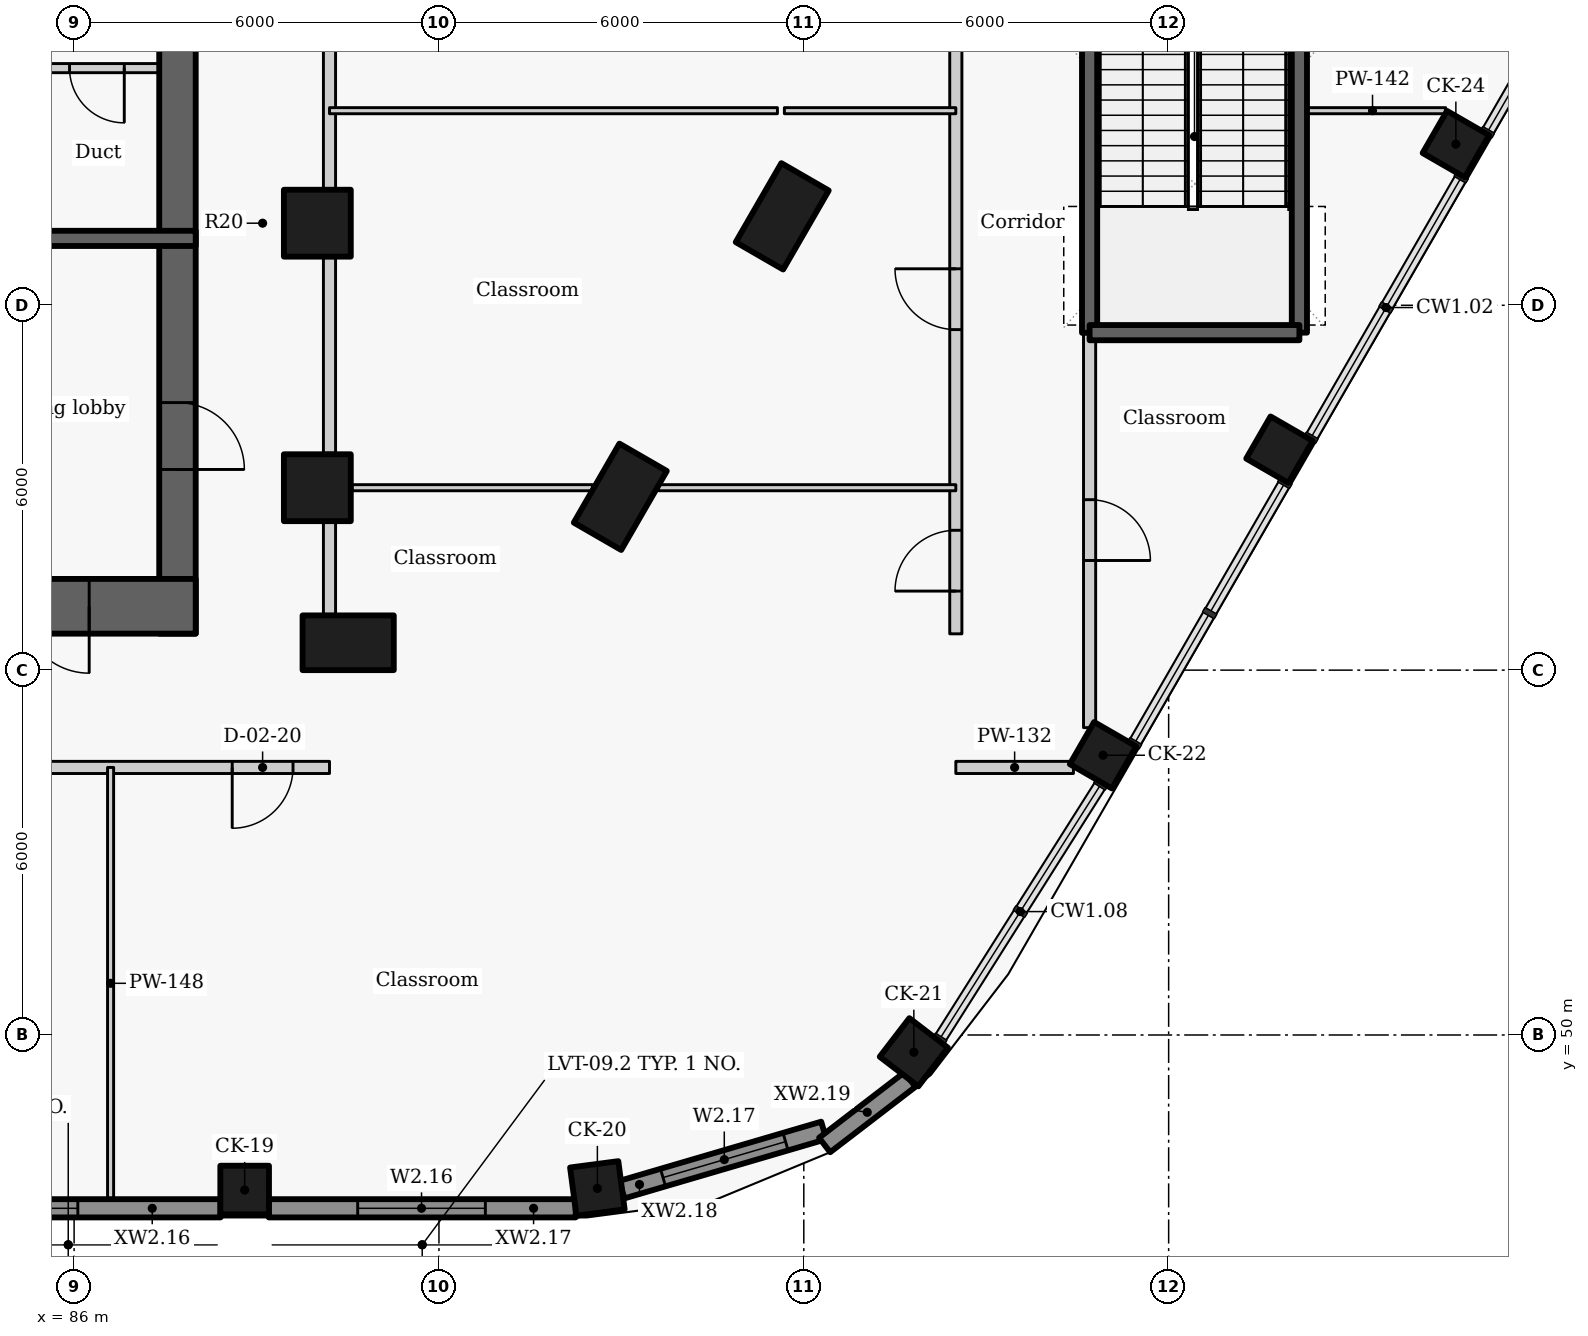
"""IFC4 building model, lengths in metres.
Left out: names, types, materials, properties, quantities, classifications, styles, units other than length and angle.
Written with IfcOpenShell. Run it as: python <this file> out.ifc"""

import sys

from ifc_helpers import new_model, si_unit, direction, frame, frame_2d, origin, origin_2d, place, context, subcontext, project, spatial, rectangle, extrude, element, fill, save


model = new_model("IFC4")
c1 = context("Model", 3, precision=1e-05, world=origin(), true_north=direction((0.0, 1.0)))
c2 = subcontext(c1, "Body", "Model", "MODEL_VIEW")
j1 = project(units=[si_unit("LENGTHUNIT", "METRE"), si_unit("PLANEANGLEUNIT", "RADIAN")], contexts=[c1])
p1 = place(None, origin())
s1 = spatial("IfcSite", under=j1, at=p1, CompositionType="ELEMENT")
p2 = place(p1, origin())
s2 = spatial("IfcBuilding", under=s1, at=p2, CompositionType="ELEMENT")
p3 = place(p2, frame((0.0, 0.0, 24.0)))
s3 = spatial("IfcBuildingStorey", under=s2, at=p3, CompositionType="ELEMENT", Elevation=24.0)
for number, where, z_axis, x_axis in (
    (1, (90.507, 56.45, 0.0), (0.0, 0.0, 1.0), (1.0, 0.0, 0.0)),
    (2, (94.982, 58.851, 0.0), (0.0, 0.0, 1.0), (0.5, 0.866, 0.0)),
    (3, (97.646, 63.463, 0.0), (0.0, 0.0, 1.0), (0.5, 0.866, 0.0)),
):
    element("IfcColumn", number, at=place(p3, frame(where, z_axis=z_axis, x_axis=x_axis)), inside=s3, PredefinedType="COLUMN", context=c2, shape_type="SweptSolid", body=[
        extrude(rectangle(XDim=1.5, YDim=0.9, at=origin_2d()), origin(), (0.0, 0.0, 1.0), 4.2),
    ])
for number, where, z_axis, x_axis in (
    (4, (90.0, 59.0, 0.0), (0.0, 0.0, 1.0), (0.0, 1.0, 0.0)),
    (5, (90.0, 63.35, 0.0), (0.0, 0.0, 1.0), (0.0, 1.0, 0.0)),
):
    element("IfcColumn", number, at=place(p3, frame(where, z_axis=z_axis, x_axis=x_axis)), inside=s3, PredefinedType="COLUMN", context=c2, shape_type="SweptSolid", body=[
        extrude(rectangle(XDim=1.1, YDim=1.1, at=origin_2d()), origin(), (0.0, 0.0, 1.0), 4.2),
    ])
for number, where, z_axis, x_axis in (
    (6, (88.805, 47.45, 0.0), (0.0, 0.0, 1.0), (1.0, 0.0, 0.0)),
    (7, (94.605, 47.477, 0.0), (0.0, 0.0, 1.0), (0.991, 0.131, 0.0)),
    (8, (99.81, 49.716, 0.0), (0.0, 0.0, 1.0), (0.609, 0.793, 0.0)),
    (9, (102.921, 54.6, 0.0), (0.0, 0.0, 1.0), (0.5, 0.866, 0.0)),
    (10, (105.822, 59.625, 0.0), (0.0, 0.0, 1.0), (0.5, 0.866, 0.0)),
    (11, (108.723, 64.65, 0.0), (0.0, 0.0, 1.0), (0.5, 0.866, 0.0)),
):
    element("IfcColumn", number, at=place(p3, frame(where, z_axis=z_axis, x_axis=x_axis)), inside=s3, PredefinedType="COLUMN", context=c2, shape_type="SweptSolid", body=[
        extrude(rectangle(XDim=0.8, YDim=0.8, at=origin_2d()), origin(), (0.0, 0.0, 1.0), 4.2),
    ])
p4 = place(p3, frame((83.398, 47.15, 0.0), z_axis=(0.0, 0.0, 1.0), x_axis=(1.0, 0.0, 0.0)))
e12 = element("IfcWall", 12, at=p4, inside=s3, PredefinedType="SOLIDWALL", context=c2, shape_type="SweptSolid", body=[
    extrude(rectangle(XDim=5.01, YDim=0.3, at=frame_2d((2.505, 0.0))), origin(), (0.0, 0.0, 1.0), 3.325),
])
p5 = place(p4, frame((0.563, 0.0, 0.9)))
e13 = element("IfcOpeningElement", 13, at=p5, cuts=e12, PredefinedType="OPENING", context=c2, shape_type="SweptSolid", body=[
    extrude(rectangle(XDim=2.1, YDim=2.05, at=frame_2d((1.05, 1.025))), frame((0.0, 0.16, 0.0), z_axis=(0.0, -1.0, 0.0), x_axis=(1.0, 0.0, 0.0)), (0.0, 0.0, 1.0), 0.32),
])
p6 = place(p3, frame((89.201, 47.15, 0.0), z_axis=(0.0, 0.0, 1.0), x_axis=(1.0, 0.0, 0.0)))
e14 = element("IfcWall", 14, at=p6, inside=s3, PredefinedType="SOLIDWALL", context=c2, shape_type="SweptSolid", body=[
    extrude(rectangle(XDim=5.048, YDim=0.3, at=frame_2d((2.524, 0.0))), origin(), (0.0, 0.0, 1.0), 3.325),
])
p7 = place(p6, frame((1.463, 0.0, 0.9)))
e15 = element("IfcOpeningElement", 15, at=p7, cuts=e14, PredefinedType="OPENING", context=c2, shape_type="SweptSolid", body=[
    extrude(rectangle(XDim=2.1, YDim=2.05, at=frame_2d((1.05, 1.025))), frame((0.0, 0.16, 0.0), z_axis=(0.0, -1.0, 0.0), x_axis=(1.0, 0.0, 0.0)), (0.0, 0.0, 1.0), 0.32),
])
p8 = place(p3, frame((95.007, 47.457, 0.0), z_axis=(0.0, 0.0, 1.0), x_axis=(0.959578633815, 0.281440660756, 0.0)))
e16 = element("IfcWall", 16, at=p8, inside=s3, PredefinedType="SOLIDWALL", context=c2, shape_type="SweptSolid", body=[
    extrude(rectangle(XDim=3.461, YDim=0.3, at=frame_2d((1.73, 0.0))), origin(), (0.0, 0.0, 1.0), 3.325),
])
p9 = place(p8, frame((0.706, 0.0, 0.9)))
e17 = element("IfcOpeningElement", 17, at=p9, cuts=e16, PredefinedType="OPENING", context=c2, shape_type="SweptSolid", body=[
    extrude(rectangle(XDim=2.1, YDim=2.05, at=frame_2d((1.05, 1.025))), frame((0.0, 0.16, 0.0), z_axis=(0.0, -1.0, 0.0), x_axis=(1.0, 0.0, 0.0)), (0.0, 0.0, 1.0), 0.32),
])
p10 = place(p3, frame((98.343, 48.191, 0.0), z_axis=(0.0, 0.0, 1.0), x_axis=(0.793403972369, 0.608695438318, 0.0)))
e18 = element("IfcWall", 18, at=p10, inside=s3, PredefinedType="SOLIDWALL", context=c2, shape_type="SweptSolid", body=[
    extrude(rectangle(XDim=1.767, YDim=0.3, at=frame_2d((0.884, 0.0))), origin(), (0.0, 0.0, 1.0), 3.325),
])
p11 = place(p3, frame((87.7, 72.2, -0.3), z_axis=(0.0, 0.0, 1.0), x_axis=(0.0, -1.0, 0.0)))
e19 = element("IfcWall", 19, at=p11, inside=s3, PredefinedType="SHEAR", context=c2, shape_type="SweptSolid", body=[
    extrude(rectangle(XDim=15.6, YDim=0.6, at=frame_2d((7.8, 0.0))), origin(), (0.0, 0.0, 1.0), 4.225),
])
p12 = place(p11, frame((11.8, 0.0, 0.3)))
e20 = element("IfcOpeningElement", 20, at=p12, cuts=e19, PredefinedType="OPENING", context=c2, shape_type="SweptSolid", body=[
    extrude(rectangle(XDim=1.1, YDim=2.1, at=frame_2d((0.55, 1.05))), frame((0.0, 0.31, 0.0), z_axis=(0.0, -1.0, 0.0), x_axis=(1.0, 0.0, 0.0)), (0.0, 0.0, 1.0), 0.62),
])
p13 = place(p3, frame((88.0, 65.9, 0.0), z_axis=(0.0, 0.0, 1.0), x_axis=(-1.0, 0.0, 0.0)))
e21 = element("IfcWall", 21, at=p13, inside=s3, PredefinedType="PARTITIONING", context=c2, shape_type="SweptSolid", body=[
    extrude(rectangle(XDim=2.603, YDim=0.15, at=frame_2d((1.302, 0.0))), origin(), (0.0, 0.0, 1.0), 3.925),
])
p14 = place(p13, frame((1.175, 0.0, 0.0)))
e22 = element("IfcOpeningElement", 22, at=p14, cuts=e21, PredefinedType="OPENING", context=c2, shape_type="SweptSolid", body=[
    extrude(rectangle(XDim=0.9, YDim=2.1, at=frame_2d((0.45, 1.05))), frame((0.0, 0.085, 0.0), z_axis=(0.0, -1.0, 0.0), x_axis=(1.0, 0.0, 0.0)), (0.0, 0.0, 1.0), 0.17),
])
p15 = place(p3, frame((80.0, 63.1, -0.3), z_axis=(0.0, 0.0, 1.0), x_axis=(1.0, 0.0, 0.0)))
e23 = element("IfcWall", 23, at=p15, inside=s3, PredefinedType="SHEAR", context=c2, shape_type="SweptSolid", body=[
    extrude(rectangle(XDim=8.0, YDim=0.25, at=frame_2d((4.0, 0.0))), origin(), (0.0, 0.0, 1.0), 4.225),
])
p16 = place(p15, frame((3.849, 0.0, 0.3)))
e24 = element("IfcOpeningElement", 24, at=p16, cuts=e23, PredefinedType="OPENING", context=c2, shape_type="SweptSolid", body=[
    extrude(rectangle(XDim=1.1, YDim=2.1, at=frame_2d((0.55, 1.05))), frame((0.0, 0.135, 0.0), z_axis=(0.0, -1.0, 0.0), x_axis=(1.0, 0.0, 0.0)), (0.0, 0.0, 1.0), 0.27),
])
p17 = place(p3, frame((88.0, 57.05, -0.3), z_axis=(0.0, 0.0, 1.0), x_axis=(-1.0, 0.0, 0.0)))
e25 = element("IfcWall", 25, at=p17, inside=s3, PredefinedType="SHEAR", context=c2, shape_type="SweptSolid", body=[
    extrude(rectangle(XDim=4.6, YDim=0.9, at=frame_2d((2.3, 0.0))), origin(), (0.0, 0.0, 1.0), 4.225),
])
p18 = place(p17, frame((1.752, 0.0, 0.3)))
e26 = element("IfcOpeningElement", 26, at=p18, cuts=e25, PredefinedType="OPENING", context=c2, shape_type="SweptSolid", body=[
    extrude(rectangle(XDim=1.1, YDim=2.1, at=frame_2d((0.55, 1.05))), frame((0.0, 0.46, 0.0), z_axis=(0.0, -1.0, 0.0), x_axis=(1.0, 0.0, 0.0)), (0.0, 0.0, 1.0), 0.92),
])
p19 = place(p3, frame((102.7, 61.547, -0.3), z_axis=(0.0, 0.0, 1.0), x_axis=(0.0, 1.0, 0.0)))
e27 = element("IfcWall", 27, at=p19, inside=s3, PredefinedType="SHEAR", context=c2, shape_type="SweptSolid", body=[
    extrude(rectangle(XDim=6.456, YDim=0.25, at=frame_2d((3.228, 0.0))), origin(), (0.0, 0.0, 1.0), 4.225),
])
p20 = place(p19, frame((5.306, 0.0, 0.3)))
e28 = element("IfcOpeningElement", 28, at=p20, cuts=e27, PredefinedType="OPENING", context=c2, shape_type="SweptSolid", body=[
    extrude(rectangle(XDim=0.9, YDim=2.1, at=frame_2d((0.45, 1.05))), frame((0.0, 0.135, 0.0), z_axis=(0.0, -1.0, 0.0), x_axis=(1.0, 0.0, 0.0)), (0.0, 0.0, 1.0), 0.27),
])
p21 = place(p3, frame((102.7, 61.553, 0.0), z_axis=(0.0, 0.0, 1.0), x_axis=(0.0, -1.0, 0.0)))
e29 = element("IfcWall", 29, at=p21, inside=s3, PredefinedType="PARTITIONING", context=c2, shape_type="SweptSolid", body=[
    extrude(rectangle(XDim=6.499, YDim=0.2, at=frame_2d((3.249, 0.0))), origin(), (0.0, 0.0, 1.0), 3.925),
])
p22 = place(p21, frame((2.75, 0.0, 0.0)))
e30 = element("IfcOpeningElement", 30, at=p22, cuts=e29, PredefinedType="OPENING", context=c2, shape_type="SweptSolid", body=[
    extrude(rectangle(XDim=1.0, YDim=2.1, at=frame_2d((0.5, 1.05))), frame((0.0, 0.11, 0.0), z_axis=(0.0, -1.0, 0.0), x_axis=(1.0, 0.0, 0.0)), (0.0, 0.0, 1.0), 0.22),
])
p23 = place(p3, frame((100.5, 56.597, 0.0), z_axis=(0.0, 0.0, 1.0), x_axis=(0.0, 1.0, 0.0)))
e31 = element("IfcWall", 31, at=p23, inside=s3, PredefinedType="PARTITIONING", context=c2, shape_type="SweptSolid", body=[
    extrude(rectangle(XDim=10.873, YDim=0.2, at=frame_2d((5.437, 0.0))), origin(), (0.0, 0.0, 1.0), 3.925),
])
p24 = place(p23, frame((5.003, 0.0, 0.0)))
e32 = element("IfcOpeningElement", 32, at=p24, cuts=e31, PredefinedType="OPENING", context=c2, shape_type="SweptSolid", body=[
    extrude(rectangle(XDim=1.0, YDim=2.1, at=frame_2d((0.5, 1.05))), frame((0.0, 0.11, 0.0), z_axis=(0.0, -1.0, 0.0), x_axis=(1.0, 0.0, 0.0)), (0.0, 0.0, 1.0), 0.22),
])
p25 = place(p23, frame((0.703, 0.0, 0.0)))
e33 = element("IfcOpeningElement", 33, at=p25, cuts=e31, PredefinedType="OPENING", context=c2, shape_type="SweptSolid", body=[
    extrude(rectangle(XDim=1.0, YDim=2.1, at=frame_2d((0.5, 1.05))), frame((0.0, 0.11, 0.0), z_axis=(0.0, -1.0, 0.0), x_axis=(1.0, 0.0, 0.0)), (0.0, 0.0, 1.0), 0.22),
])
p26 = place(p3, frame((90.2, 56.917, 0.0), z_axis=(0.0, 0.0, 1.0), x_axis=(0.0, 1.0, 0.0)))
e34 = element("IfcWall", 34, at=p26, inside=s3, PredefinedType="PARTITIONING", context=c2, shape_type="SweptSolid", body=[
    extrude(rectangle(XDim=1.516, YDim=0.2, at=frame_2d((0.758, 0.0))), origin(), (0.0, 0.0, 1.0), 3.925),
])
for number, where, z_axis, x_axis in (
    (35, (90.2, 59.567, 0.0), (0.0, 0.0, 1.0), (0.0, 1.0, 0.0)),
    (36, (90.2, 63.917, 0.0), (0.0, 0.0, 1.0), (0.0, 1.0, 0.0)),
):
    element("IfcWall", number, at=place(p3, frame(where, z_axis=z_axis, x_axis=x_axis)), inside=s3, PredefinedType="PARTITIONING", context=c2, shape_type="SweptSolid", body=[
        extrude(rectangle(XDim=3.216, YDim=0.2, at=frame_2d((1.608, 0.0))), origin(), (0.0, 0.0, 1.0), 3.405),
    ])
p27 = place(p3, frame((106.15, 61.55, -0.3), z_axis=(0.0, 0.0, 1.0), x_axis=(0.0, 1.0, 0.0)))
e37 = element("IfcWall", 37, at=p27, inside=s3, PredefinedType="SHEAR", context=c2, shape_type="SweptSolid", body=[
    extrude(rectangle(XDim=6.45, YDim=0.25, at=frame_2d((3.225, 0.0))), origin(), (0.0, 0.0, 1.0), 4.225),
])
p28 = place(p3, frame((90.2, 54.4, 0.0), z_axis=(0.0, 0.0, 1.0), x_axis=(-1.0, 0.0, 0.0)))
e38 = element("IfcWall", 38, at=p28, inside=s3, PredefinedType="PARTITIONING", context=c2, shape_type="SweptSolid", body=[
    extrude(rectangle(XDim=20.4, YDim=0.2, at=frame_2d((10.2, 0.0))), origin(), (0.0, 0.0, 1.0), 3.925),
])
p29 = place(p28, frame((18.8, 0.0, 0.0)))
e39 = element("IfcOpeningElement", 39, at=p29, cuts=e38, PredefinedType="OPENING", context=c2, shape_type="SweptSolid", body=[
    extrude(rectangle(XDim=1.0, YDim=2.1, at=frame_2d((0.5, 1.05))), frame((0.0, 0.11, 0.0), z_axis=(0.0, -1.0, 0.0), x_axis=(1.0, 0.0, 0.0)), (0.0, 0.0, 1.0), 0.22),
])
p30 = place(p28, frame((0.6, 0.0, 0.0)))
e40 = element("IfcOpeningElement", 40, at=p30, cuts=e38, PredefinedType="OPENING", context=c2, shape_type="SweptSolid", body=[
    extrude(rectangle(XDim=1.0, YDim=2.1, at=frame_2d((0.5, 1.05))), frame((0.0, 0.11, 0.0), z_axis=(0.0, -1.0, 0.0), x_axis=(1.0, 0.0, 0.0)), (0.0, 0.0, 1.0), 0.22),
])
p31 = place(p28, frame((10.1, 0.0, 0.0)))
e41 = element("IfcOpeningElement", 41, at=p31, cuts=e38, PredefinedType="OPENING", context=c2, shape_type="SweptSolid", body=[
    extrude(rectangle(XDim=1.0, YDim=2.1, at=frame_2d((0.5, 1.05))), frame((0.0, 0.11, 0.0), z_axis=(0.0, -1.0, 0.0), x_axis=(1.0, 0.0, 0.0)), (0.0, 0.0, 1.0), 0.22),
])
p32 = place(p3, frame((100.5, 54.4, 0.0), z_axis=(0.0, 0.0, 1.0), x_axis=(1.0, 0.0, 0.0)))
e42 = element("IfcWall", 42, at=p32, inside=s3, PredefinedType="PARTITIONING", context=c2, shape_type="SweptSolid", body=[
    extrude(rectangle(XDim=1.934, YDim=0.2, at=frame_2d((0.967, 0.0))), origin(), (0.0, 0.0, 1.0), 3.925),
])
p33 = place(p3, frame((102.7, 61.55, -0.3), z_axis=(0.0, 0.0, 1.0), x_axis=(1.0, 0.0, 0.0)))
e43 = element("IfcWall", 43, at=p33, inside=s3, PredefinedType="SHEAR", context=c2, shape_type="SweptSolid", body=[
    extrude(rectangle(XDim=3.45, YDim=0.25, at=frame_2d((1.725, 0.0))), origin(), (0.0, 0.0, 1.0), 4.225),
])
p34 = place(p3, frame((90.2, 65.2, 0.0), z_axis=(0.0, 0.0, 1.0), x_axis=(1.0, 0.0, 0.0)))
e44 = element("IfcWall", 44, at=p34, inside=s3, PredefinedType="PARTITIONING", context=c2, shape_type="SweptSolid", body=[
    extrude(rectangle(XDim=7.366, YDim=0.1, at=frame_2d((3.683, 0.0))), origin(), (0.0, 0.0, 1.0), 3.925),
])
p35 = place(p3, frame((97.68, 65.2, 0.0), z_axis=(0.0, 0.0, 1.0), x_axis=(1.0, 0.0, 0.0)))
e45 = element("IfcWall", 45, at=p35, inside=s3, PredefinedType="PARTITIONING", context=c2, shape_type="SweptSolid", body=[
    extrude(rectangle(XDim=2.82, YDim=0.1, at=frame_2d((1.41, 0.0))), origin(), (0.0, 0.0, 1.0), 3.305),
])
p36 = place(p3, frame((106.15, 65.2, 0.0), z_axis=(0.0, 0.0, 1.0), x_axis=(1.0, 0.0, 0.0)))
e46 = element("IfcWall", 46, at=p36, inside=s3, PredefinedType="PARTITIONING", context=c2, shape_type="SweptSolid", body=[
    extrude(rectangle(XDim=2.406, YDim=0.1, at=frame_2d((1.203, 0.0))), origin(), (0.0, 0.0, 1.0), 3.925),
])
p37 = place(p3, frame((90.57, 59.0, 0.0), z_axis=(0.0, 0.0, 1.0), x_axis=(1.0, 0.0, 0.0)))
e47 = element("IfcWall", 47, at=p37, inside=s3, PredefinedType="PARTITIONING", context=c2, shape_type="SweptSolid", body=[
    extrude(rectangle(XDim=3.956, YDim=0.1, at=frame_2d((1.978, 0.0))), origin(), (0.0, 0.0, 1.0), 3.925),
])
p38 = place(p3, frame((95.612, 59.0, 0.0), z_axis=(0.0, 0.0, 1.0), x_axis=(1.0, 0.0, 0.0)))
e48 = element("IfcWall", 48, at=p38, inside=s3, PredefinedType="PARTITIONING", context=c2, shape_type="SweptSolid", body=[
    extrude(rectangle(XDim=4.888, YDim=0.1, at=frame_2d((2.444, 0.0))), origin(), (0.0, 0.0, 1.0), 3.925),
])
p39 = place(p3, frame((86.6, 47.3, 0.0), z_axis=(0.0, 0.0, 1.0), x_axis=(0.0, 1.0, 0.0)))
e49 = element("IfcWall", 49, at=p39, inside=s3, PredefinedType="PARTITIONING", context=c2, shape_type="SweptSolid", body=[
    extrude(rectangle(XDim=7.1, YDim=0.1, at=frame_2d((3.55, 0.0))), origin(), (0.0, 0.0, 1.0), 3.925),
])
p40 = place(p5, origin())
e50 = element("IfcWindow", 50, at=p40, inside=s3, PartitioningType="SINGLE_PANEL", PredefinedType="WINDOW", context=c2, shape_type="SweptSolid", body=[
    extrude(rectangle(XDim=2.1, YDim=2.05, at=frame_2d((1.05, 1.025))), frame((0.0, 0.03, 0.0), z_axis=(0.0, -1.0, 0.0), x_axis=(1.0, 0.0, 0.0)), (0.0, 0.0, 1.0), 0.06),
])
fill(e13, e50)
p41 = place(p7, origin())
e51 = element("IfcWindow", 51, at=p41, inside=s3, PartitioningType="SINGLE_PANEL", PredefinedType="WINDOW", context=c2, shape_type="SweptSolid", body=[
    extrude(rectangle(XDim=2.1, YDim=2.05, at=frame_2d((1.05, 1.025))), frame((0.0, 0.03, 0.0), z_axis=(0.0, -1.0, 0.0), x_axis=(1.0, 0.0, 0.0)), (0.0, 0.0, 1.0), 0.06),
])
fill(e15, e51)
p42 = place(p9, origin())
e52 = element("IfcWindow", 52, at=p42, inside=s3, PartitioningType="SINGLE_PANEL", PredefinedType="WINDOW", context=c2, shape_type="SweptSolid", body=[
    extrude(rectangle(XDim=2.1, YDim=2.05, at=frame_2d((1.05, 1.025))), frame((0.0, 0.03, 0.0), z_axis=(0.0, -1.0, 0.0), x_axis=(1.0, 0.0, 0.0)), (0.0, 0.0, 1.0), 0.06),
])
fill(e17, e52)
p43 = place(p14, origin())
e53 = element("IfcDoor", 53, at=p43, inside=s3, OperationType="SINGLE_SWING_LEFT", PredefinedType="DOOR", context=c2, shape_type="SweptSolid", body=[
    extrude(rectangle(XDim=0.9, YDim=2.1, at=frame_2d((0.45, 1.05))), frame((0.0, 0.025, 0.0), z_axis=(0.0, -1.0, 0.0), x_axis=(1.0, 0.0, 0.0)), (0.0, 0.0, 1.0), 0.05),
])
fill(e22, e53)
p44 = place(p22, origin())
e54 = element("IfcDoor", 54, at=p44, inside=s3, OperationType="SINGLE_SWING_RIGHT", PredefinedType="DOOR", context=c2, shape_type="SweptSolid", body=[
    extrude(rectangle(XDim=1.0, YDim=2.1, at=frame_2d((0.5, 1.05))), frame((0.0, 0.025, 0.0), z_axis=(0.0, -1.0, 0.0), x_axis=(1.0, 0.0, 0.0)), (0.0, 0.0, 1.0), 0.05),
])
fill(e30, e54)
p45 = place(p24, origin())
e55 = element("IfcDoor", 55, at=p45, inside=s3, OperationType="SINGLE_SWING_RIGHT", PredefinedType="DOOR", context=c2, shape_type="SweptSolid", body=[
    extrude(rectangle(XDim=1.0, YDim=2.1, at=frame_2d((0.5, 1.05))), frame((0.0, 0.025, 0.0), z_axis=(0.0, -1.0, 0.0), x_axis=(1.0, 0.0, 0.0)), (0.0, 0.0, 1.0), 0.05),
])
fill(e32, e55)
p46 = place(p25, origin())
e56 = element("IfcDoor", 56, at=p46, inside=s3, OperationType="SINGLE_SWING_LEFT", PredefinedType="DOOR", context=c2, shape_type="SweptSolid", body=[
    extrude(rectangle(XDim=1.0, YDim=2.1, at=frame_2d((0.5, 1.05))), frame((0.0, 0.025, 0.0), z_axis=(0.0, -1.0, 0.0), x_axis=(1.0, 0.0, 0.0)), (0.0, 0.0, 1.0), 0.05),
])
fill(e33, e56)
p47 = place(p30, origin())
e57 = element("IfcDoor", 57, at=p47, inside=s3, OperationType="SINGLE_SWING_RIGHT", PredefinedType="DOOR", context=c2, shape_type="SweptSolid", body=[
    extrude(rectangle(XDim=1.0, YDim=2.1, at=frame_2d((0.5, 1.05))), frame((0.0, 0.025, 0.0), z_axis=(0.0, -1.0, 0.0), x_axis=(1.0, 0.0, 0.0)), (0.0, 0.0, 1.0), 0.05),
])
fill(e40, e57)
p48 = place(p12, origin())
e58 = element("IfcDoor", 58, at=p48, inside=s3, OperationType="SINGLE_SWING_RIGHT", PredefinedType="DOOR", context=c2, shape_type="SweptSolid", body=[
    extrude(rectangle(XDim=1.1, YDim=2.1, at=frame_2d((0.55, 1.05))), frame((0.0, 0.025, 0.0), z_axis=(0.0, -1.0, 0.0), x_axis=(1.0, 0.0, 0.0)), (0.0, 0.0, 1.0), 0.05),
])
fill(e20, e58)
p49 = place(p18, origin())
e59 = element("IfcDoor", 59, at=p49, inside=s3, OperationType="SINGLE_SWING_LEFT", PredefinedType="DOOR", context=c2, shape_type="SweptSolid", body=[
    extrude(rectangle(XDim=1.1, YDim=2.1, at=frame_2d((0.55, 1.05))), frame((0.0, 0.025, 0.0), z_axis=(0.0, -1.0, 0.0), x_axis=(1.0, 0.0, 0.0)), (0.0, 0.0, 1.0), 0.05),
])
fill(e26, e59)
save(model, sys.argv[1])
